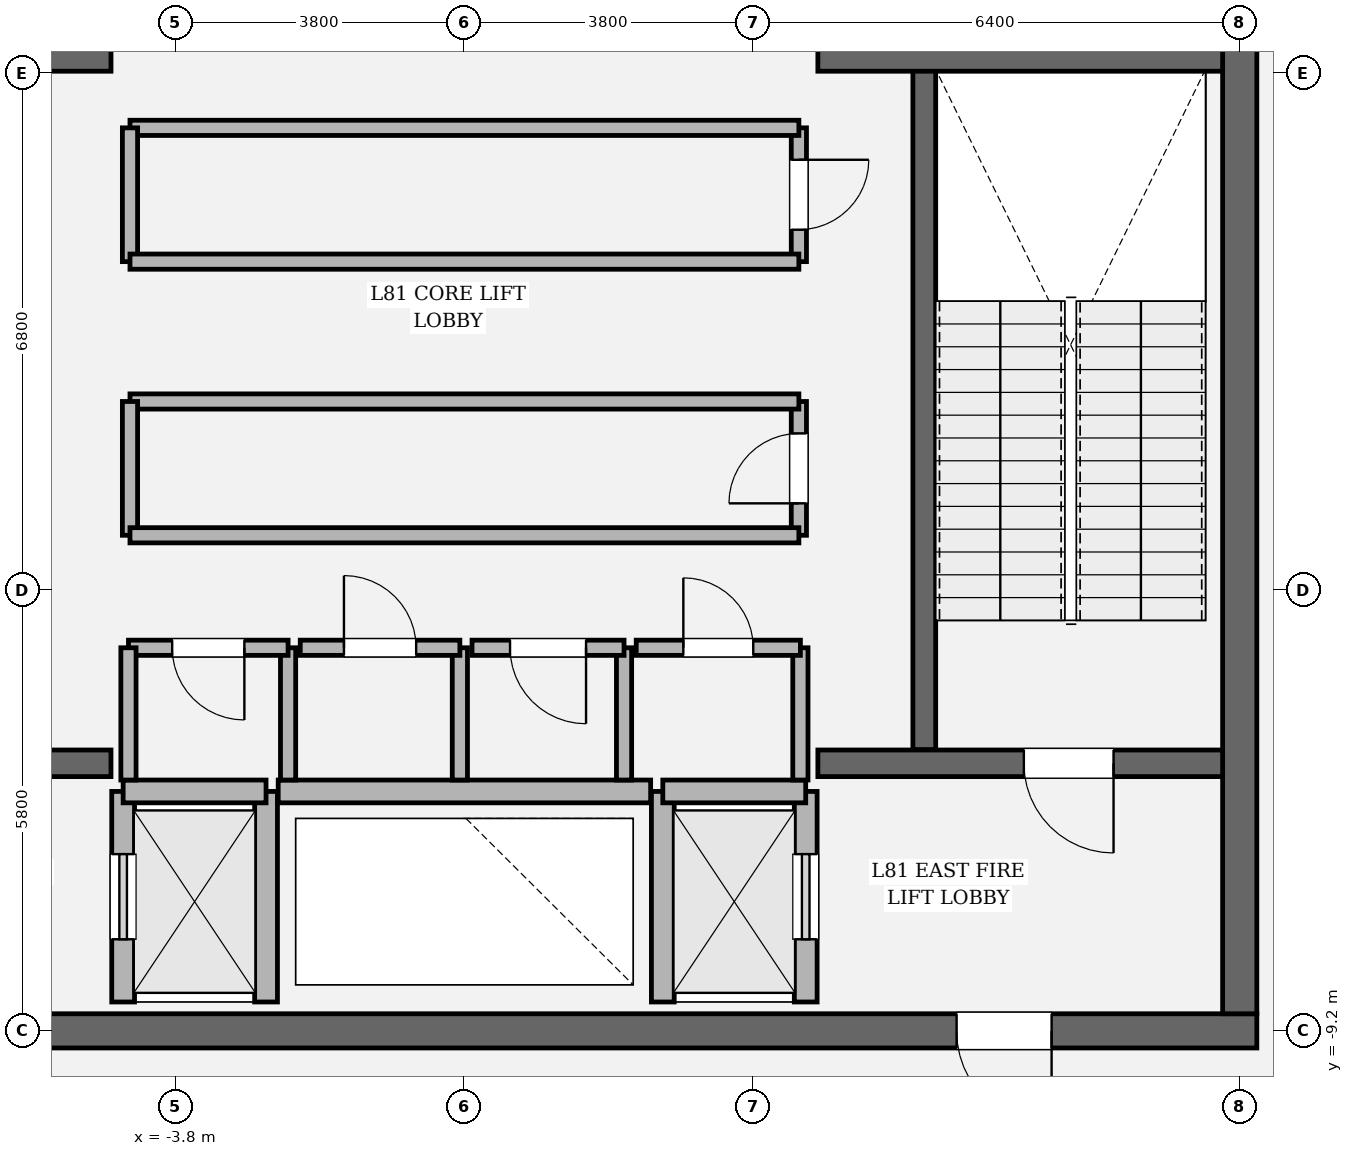
"""IFC4 building model, lengths in metres.
Left out: names, types, materials, properties, quantities, classifications, styles, units other than length and angle.
Written with IfcOpenShell. Run it as: python <this file> out.ifc"""

import sys

from ifc_helpers import new_model, si_unit, direction, frame, frame_2d, origin, place, context, subcontext, project, spatial, rectangle, extrude, element, fill, save


model = new_model("IFC4")
c1 = context("Model", 3, precision=1e-05, world=origin(), true_north=direction((0.0, 1.0)))
c2 = subcontext(c1, "Body", "Model", "MODEL_VIEW")
j1 = project(units=[si_unit("LENGTHUNIT", "METRE"), si_unit("PLANEANGLEUNIT", "RADIAN")], contexts=[c1])
p1 = place(None, origin())
s1 = spatial("IfcSite", under=j1, at=p1, CompositionType="ELEMENT")
p2 = place(p1, origin())
s2 = spatial("IfcBuilding", under=s1, at=p2, CompositionType="ELEMENT")
p3 = place(p2, frame((0.0, 0.0, 343.8)))
s3 = spatial("IfcBuildingStorey", under=s2, at=p3, CompositionType="ELEMENT", Elevation=343.8)
p4 = place(p3, frame((10.425, -9.2, 0.0), z_axis=(0.0, 0.0, 1.0), x_axis=(-1.0, 0.0, 0.0)))
e1 = element("IfcWall", 1, at=p4, inside=s3, PredefinedType="SHEAR", context=c2, shape_type="SweptSolid", body=[
    extrude(rectangle(XDim=20.85, YDim=0.45, at=frame_2d((10.425, 0.0))), origin(), (0.0, 0.0, 1.0), 4.5),
])
p5 = place(p4, frame((2.7, 0.0, 0.0)))
e2 = element("IfcOpeningElement", 2, at=p5, cuts=e1, PredefinedType="OPENING", context=c2, shape_type="SweptSolid", body=[
    extrude(rectangle(XDim=1.25, YDim=2.25, at=frame_2d((0.625, 1.125))), frame((0.0, 0.235, 0.0), z_axis=(0.0, -1.0, 0.0), x_axis=(1.0, 0.0, 0.0)), (0.0, 0.0, 1.0), 0.47),
])
p6 = place(p4, frame((16.9, 0.0, 0.0)))
e3 = element("IfcOpeningElement", 3, at=p6, cuts=e1, PredefinedType="OPENING", context=c2, shape_type="SweptSolid", body=[
    extrude(rectangle(XDim=1.25, YDim=2.25, at=frame_2d((0.625, 1.125))), frame((0.0, 0.235, 0.0), z_axis=(0.0, -1.0, 0.0), x_axis=(1.0, 0.0, 0.0)), (0.0, 0.0, 1.0), 0.47),
])
p7 = place(p3, frame((10.2, 8.975, 0.0), z_axis=(0.0, 0.0, 1.0), x_axis=(0.0, -1.0, 0.0)))
e4 = element("IfcWall", 4, at=p7, inside=s3, PredefinedType="SHEAR", context=c2, shape_type="SweptSolid", body=[
    extrude(rectangle(XDim=17.95, YDim=0.45, at=frame_2d((8.975, 0.0))), origin(), (0.0, 0.0, 1.0), 4.5),
])
p8 = place(p7, frame((4.005, 0.0, 0.0)))
e5 = element("IfcOpeningElement", 5, at=p8, cuts=e4, PredefinedType="OPENING", context=c2, shape_type="SweptSolid", body=[
    extrude(rectangle(XDim=1.18, YDim=2.2, at=frame_2d((0.59, 1.1))), frame((0.0, 0.235, 0.0), z_axis=(0.0, -1.0, 0.0), x_axis=(1.0, 0.0, 0.0)), (0.0, 0.0, 1.0), 0.47),
])
p9 = place(p3, frame((6.05, 3.45, 0.0), z_axis=(0.0, 0.0, 1.0), x_axis=(0.0, -1.0, 0.0)))
e6 = element("IfcWall", 6, at=p9, inside=s3, PredefinedType="SOLIDWALL", context=c2, shape_type="SweptSolid", body=[
    extrude(rectangle(XDim=8.95, YDim=0.3, at=frame_2d((4.475, 0.0))), origin(), (0.0, 0.0, 1.0), 4.5),
])
p10 = place(p3, frame((-9.975, -5.68, 0.0), z_axis=(0.0, 0.0, 1.0), x_axis=(1.0, 0.0, 0.0)))
e7 = element("IfcWall", 7, at=p10, inside=s3, PredefinedType="SOLIDWALL", context=c2, shape_type="SweptSolid", body=[
    extrude(rectangle(XDim=5.325, YDim=0.35, at=frame_2d((2.663, 0.0))), origin(), (0.0, 0.0, 1.0), 4.5),
])
p11 = place(p10, frame((1.435, 0.0, 0.0)))
e8 = element("IfcOpeningElement", 8, at=p11, cuts=e7, PredefinedType="OPENING", context=c2, shape_type="SweptSolid", body=[
    extrude(rectangle(XDim=1.18, YDim=2.2, at=frame_2d((0.59, 1.1))), frame((0.0, 0.185, 0.0), z_axis=(0.0, -1.0, 0.0), x_axis=(1.0, 0.0, 0.0)), (0.0, 0.0, 1.0), 0.37),
])
p12 = place(p3, frame((4.65, -5.68, 0.0), z_axis=(0.0, 0.0, 1.0), x_axis=(1.0, 0.0, 0.0)))
e9 = element("IfcWall", 9, at=p12, inside=s3, PredefinedType="SOLIDWALL", context=c2, shape_type="SweptSolid", body=[
    extrude(rectangle(XDim=5.325, YDim=0.35, at=frame_2d((2.663, 0.0))), origin(), (0.0, 0.0, 1.0), 4.5),
])
p13 = place(p12, frame((2.71, 0.0, 0.0)))
e10 = element("IfcOpeningElement", 10, at=p13, cuts=e9, PredefinedType="OPENING", context=c2, shape_type="SweptSolid", body=[
    extrude(rectangle(XDim=1.18, YDim=2.2, at=frame_2d((0.59, 1.1))), frame((0.0, 0.185, 0.0), z_axis=(0.0, -1.0, 0.0), x_axis=(1.0, 0.0, 0.0)), (0.0, 0.0, 1.0), 0.37),
])
for number, where, z_axis, x_axis in (
    (11, (-9.975, 3.6, 0.0), (0.0, 0.0, 1.0), (1.0, 0.0, 0.0)),
    (12, (4.65, 3.6, 0.0), (0.0, 0.0, 1.0), (1.0, 0.0, 0.0)),
):
    element("IfcWall", number, at=place(p3, frame(where, z_axis=z_axis, x_axis=x_axis)), inside=s3, PredefinedType="SOLIDWALL", context=c2, shape_type="SweptSolid", body=[
        extrude(rectangle(XDim=5.325, YDim=0.35, at=frame_2d((2.663, 0.0))), origin(), (0.0, 0.0, 1.0), 4.5),
    ])
p14 = place(p3, frame((-4.49, -8.82, 0.0), z_axis=(0.0, 0.0, 1.0), x_axis=(0.0, 1.0, 0.0)))
e13 = element("IfcWall", 13, at=p14, inside=s3, PredefinedType="SOLIDWALL", context=c2, shape_type="SweptSolid", body=[
    extrude(rectangle(XDim=2.77, YDim=0.3, at=frame_2d((1.385, 0.0))), origin(), (0.0, 0.0, 1.0), 4.28),
])
p15 = place(p14, frame((0.825, 0.0, 0.0)))
e14 = element("IfcOpeningElement", 14, at=p15, cuts=e13, PredefinedType="OPENING", context=c2, shape_type="SweptSolid", body=[
    extrude(rectangle(XDim=1.12, YDim=2.25, at=frame_2d((0.56, 1.125))), frame((0.0, 0.16, 0.0), z_axis=(0.0, -1.0, 0.0), x_axis=(1.0, 0.0, 0.0)), (0.0, 0.0, 1.0), 0.32),
])
p16 = place(p3, frame((-2.61, -8.82, 0.0), z_axis=(0.0, 0.0, 1.0), x_axis=(0.0, 1.0, 0.0)))
e15 = element("IfcWall", 15, at=p16, inside=s3, PredefinedType="SOLIDWALL", context=c2, shape_type="SweptSolid", body=[
    extrude(rectangle(XDim=2.77, YDim=0.3, at=frame_2d((1.385, 0.0))), origin(), (0.0, 0.0, 1.0), 4.28),
])
p17 = place(p3, frame((-4.49, -6.05, 0.0), z_axis=(0.0, 0.0, 1.0), x_axis=(1.0, 0.0, 0.0)))
e16 = element("IfcWall", 16, at=p17, inside=s3, PredefinedType="SOLIDWALL", context=c2, shape_type="SweptSolid", body=[
    extrude(rectangle(XDim=1.88, YDim=0.3, at=frame_2d((0.94, 0.0))), origin(), (0.0, 0.0, 1.0), 4.28),
])
p18 = place(p3, frame((4.49, -8.82, 0.0), z_axis=(0.0, 0.0, 1.0), x_axis=(0.0, 1.0, 0.0)))
e17 = element("IfcWall", 17, at=p18, inside=s3, PredefinedType="SOLIDWALL", context=c2, shape_type="SweptSolid", body=[
    extrude(rectangle(XDim=2.77, YDim=0.3, at=frame_2d((1.385, 0.0))), origin(), (0.0, 0.0, 1.0), 4.28),
])
p19 = place(p18, frame((0.825, 0.0, 0.0)))
e18 = element("IfcOpeningElement", 18, at=p19, cuts=e17, PredefinedType="OPENING", context=c2, shape_type="SweptSolid", body=[
    extrude(rectangle(XDim=1.12, YDim=2.25, at=frame_2d((0.56, 1.125))), frame((0.0, 0.16, 0.0), z_axis=(0.0, -1.0, 0.0), x_axis=(1.0, 0.0, 0.0)), (0.0, 0.0, 1.0), 0.32),
])
p20 = place(p3, frame((2.61, -8.82, 0.0), z_axis=(0.0, 0.0, 1.0), x_axis=(0.0, 1.0, 0.0)))
e19 = element("IfcWall", 19, at=p20, inside=s3, PredefinedType="SOLIDWALL", context=c2, shape_type="SweptSolid", body=[
    extrude(rectangle(XDim=2.77, YDim=0.3, at=frame_2d((1.385, 0.0))), origin(), (0.0, 0.0, 1.0), 4.28),
])
p21 = place(p3, frame((2.61, -6.05, 0.0), z_axis=(0.0, 0.0, 1.0), x_axis=(1.0, 0.0, 0.0)))
e20 = element("IfcWall", 20, at=p21, inside=s3, PredefinedType="SOLIDWALL", context=c2, shape_type="SweptSolid", body=[
    extrude(rectangle(XDim=1.88, YDim=0.3, at=frame_2d((0.94, 0.0))), origin(), (0.0, 0.0, 1.0), 4.28),
])
p22 = place(p3, frame((-2.45, -6.05, 0.0), z_axis=(0.0, 0.0, 1.0), x_axis=(1.0, 0.0, 0.0)))
e21 = element("IfcWall", 21, at=p22, inside=s3, PredefinedType="SOLIDWALL", context=c2, shape_type="SweptSolid", body=[
    extrude(rectangle(XDim=4.9, YDim=0.3, at=frame_2d((2.45, 0.0))), origin(), (0.0, 0.0, 1.0), 4.28),
])
p23 = place(p3, frame((-2.32, -5.9, 0.0), z_axis=(0.0, 0.0, 1.0), x_axis=(0.0, 1.0, 0.0)))
e22 = element("IfcWall", 22, at=p23, inside=s3, PredefinedType="SOLIDWALL", context=c2, shape_type="SweptSolid", body=[
    extrude(rectangle(XDim=1.74, YDim=0.2, at=frame_2d((0.87, 0.0))), origin(), (0.0, 0.0, 1.0), 4.28),
])
p24 = place(p3, frame((-2.32, -4.16, 0.0), z_axis=(0.0, 0.0, 1.0), x_axis=(-1.0, 0.0, 0.0)))
e23 = element("IfcWall", 23, at=p24, inside=s3, PredefinedType="SOLIDWALL", context=c2, shape_type="SweptSolid", body=[
    extrude(rectangle(XDim=2.1, YDim=0.2, at=frame_2d((1.05, 0.0))), origin(), (0.0, 0.0, 1.0), 4.28),
])
p25 = place(p24, frame((0.575, 0.0, 0.0)))
e24 = element("IfcOpeningElement", 24, at=p25, cuts=e23, PredefinedType="OPENING", context=c2, shape_type="SweptSolid", body=[
    extrude(rectangle(XDim=0.95, YDim=2.15, at=frame_2d((0.475, 1.075))), frame((0.0, 0.11, 0.0), z_axis=(0.0, -1.0, 0.0), x_axis=(1.0, 0.0, 0.0)), (0.0, 0.0, 1.0), 0.22),
])
for number, where, z_axis, x_axis in (
    (25, (-4.42, -4.16, 0.0), (0.0, 0.0, 1.0), (0.0, -1.0, 0.0)),
    (26, (-0.06, -5.9, 0.0), (0.0, 0.0, 1.0), (0.0, 1.0, 0.0)),
):
    element("IfcWall", number, at=place(p3, frame(where, z_axis=z_axis, x_axis=x_axis)), inside=s3, PredefinedType="SOLIDWALL", context=c2, shape_type="SweptSolid", body=[
        extrude(rectangle(XDim=1.74, YDim=0.2, at=frame_2d((0.87, 0.0))), origin(), (0.0, 0.0, 1.0), 4.28),
    ])
p26 = place(p3, frame((-0.06, -4.16, 0.0), z_axis=(0.0, 0.0, 1.0), x_axis=(-1.0, 0.0, 0.0)))
e27 = element("IfcWall", 27, at=p26, inside=s3, PredefinedType="SOLIDWALL", context=c2, shape_type="SweptSolid", body=[
    extrude(rectangle(XDim=2.1, YDim=0.2, at=frame_2d((1.05, 0.0))), origin(), (0.0, 0.0, 1.0), 4.28),
])
p27 = place(p26, frame((0.575, 0.0, 0.0)))
e28 = element("IfcOpeningElement", 28, at=p27, cuts=e27, PredefinedType="OPENING", context=c2, shape_type="SweptSolid", body=[
    extrude(rectangle(XDim=0.95, YDim=2.15, at=frame_2d((0.475, 1.075))), frame((0.0, 0.11, 0.0), z_axis=(0.0, -1.0, 0.0), x_axis=(1.0, 0.0, 0.0)), (0.0, 0.0, 1.0), 0.22),
])
p28 = place(p3, frame((2.1, -5.9, 0.0), z_axis=(0.0, 0.0, 1.0), x_axis=(0.0, 1.0, 0.0)))
e29 = element("IfcWall", 29, at=p28, inside=s3, PredefinedType="SOLIDWALL", context=c2, shape_type="SweptSolid", body=[
    extrude(rectangle(XDim=1.74, YDim=0.2, at=frame_2d((0.87, 0.0))), origin(), (0.0, 0.0, 1.0), 4.28),
])
p29 = place(p3, frame((2.1, -4.16, 0.0), z_axis=(0.0, 0.0, 1.0), x_axis=(-1.0, 0.0, 0.0)))
e30 = element("IfcWall", 30, at=p29, inside=s3, PredefinedType="SOLIDWALL", context=c2, shape_type="SweptSolid", body=[
    extrude(rectangle(XDim=2.0, YDim=0.2, at=frame_2d((1.0, 0.0))), origin(), (0.0, 0.0, 1.0), 4.28),
])
p30 = place(p29, frame((0.5, 0.0, 0.0)))
e31 = element("IfcOpeningElement", 31, at=p30, cuts=e30, PredefinedType="OPENING", context=c2, shape_type="SweptSolid", body=[
    extrude(rectangle(XDim=1.0, YDim=2.15, at=frame_2d((0.5, 1.075))), frame((0.0, 0.11, 0.0), z_axis=(0.0, -1.0, 0.0), x_axis=(1.0, 0.0, 0.0)), (0.0, 0.0, 1.0), 0.22),
])
p31 = place(p3, frame((4.42, -5.9, 0.0), z_axis=(0.0, 0.0, 1.0), x_axis=(0.0, 1.0, 0.0)))
e32 = element("IfcWall", 32, at=p31, inside=s3, PredefinedType="SOLIDWALL", context=c2, shape_type="SweptSolid", body=[
    extrude(rectangle(XDim=1.74, YDim=0.2, at=frame_2d((0.87, 0.0))), origin(), (0.0, 0.0, 1.0), 4.28),
])
p32 = place(p3, frame((4.42, -4.16, 0.0), z_axis=(0.0, 0.0, 1.0), x_axis=(-1.0, 0.0, 0.0)))
e33 = element("IfcWall", 33, at=p32, inside=s3, PredefinedType="SOLIDWALL", context=c2, shape_type="SweptSolid", body=[
    extrude(rectangle(XDim=2.16, YDim=0.2, at=frame_2d((1.08, 0.0))), origin(), (0.0, 0.0, 1.0), 4.28),
])
p33 = place(p32, frame((0.62, 0.0, 0.0)))
e34 = element("IfcOpeningElement", 34, at=p33, cuts=e33, PredefinedType="OPENING", context=c2, shape_type="SweptSolid", body=[
    extrude(rectangle(XDim=0.92, YDim=2.1, at=frame_2d((0.46, 1.05))), frame((0.0, 0.11, 0.0), z_axis=(0.0, -1.0, 0.0), x_axis=(1.0, 0.0, 0.0)), (0.0, 0.0, 1.0), 0.22),
])
p34 = place(p3, frame((4.4, -2.68, 0.0), z_axis=(0.0, 0.0, 1.0), x_axis=(0.0, 1.0, 0.0)))
e35 = element("IfcWall", 35, at=p34, inside=s3, PredefinedType="SOLIDWALL", context=c2, shape_type="SweptSolid", body=[
    extrude(rectangle(XDim=1.76, YDim=0.2, at=frame_2d((0.88, 0.0))), origin(), (0.0, 0.0, 1.0), 4.28),
])
p35 = place(p34, frame((0.42, 0.0, 0.0)))
e36 = element("IfcOpeningElement", 36, at=p35, cuts=e35, PredefinedType="OPENING", context=c2, shape_type="SweptSolid", body=[
    extrude(rectangle(XDim=0.92, YDim=2.1, at=frame_2d((0.46, 1.05))), frame((0.0, 0.11, 0.0), z_axis=(0.0, -1.0, 0.0), x_axis=(1.0, 0.0, 0.0)), (0.0, 0.0, 1.0), 0.22),
])
p36 = place(p3, frame((4.4, -0.92, 0.0), z_axis=(0.0, 0.0, 1.0), x_axis=(-1.0, 0.0, 0.0)))
e37 = element("IfcWall", 37, at=p36, inside=s3, PredefinedType="SOLIDWALL", context=c2, shape_type="SweptSolid", body=[
    extrude(rectangle(XDim=8.8, YDim=0.2, at=frame_2d((4.4, 0.0))), origin(), (0.0, 0.0, 1.0), 4.28),
])
p37 = place(p3, frame((-4.4, -0.92, 0.0), z_axis=(0.0, 0.0, 1.0), x_axis=(0.0, -1.0, 0.0)))
e38 = element("IfcWall", 38, at=p37, inside=s3, PredefinedType="SOLIDWALL", context=c2, shape_type="SweptSolid", body=[
    extrude(rectangle(XDim=1.76, YDim=0.2, at=frame_2d((0.88, 0.0))), origin(), (0.0, 0.0, 1.0), 4.28),
])
p38 = place(p3, frame((-4.4, -2.68, 0.0), z_axis=(0.0, 0.0, 1.0), x_axis=(1.0, 0.0, 0.0)))
e39 = element("IfcWall", 39, at=p38, inside=s3, PredefinedType="SOLIDWALL", context=c2, shape_type="SweptSolid", body=[
    extrude(rectangle(XDim=8.8, YDim=0.2, at=frame_2d((4.4, 0.0))), origin(), (0.0, 0.0, 1.0), 4.28),
])
p39 = place(p3, frame((4.4, 0.92, 0.0), z_axis=(0.0, 0.0, 1.0), x_axis=(0.0, 1.0, 0.0)))
e40 = element("IfcWall", 40, at=p39, inside=s3, PredefinedType="SOLIDWALL", context=c2, shape_type="SweptSolid", body=[
    extrude(rectangle(XDim=1.76, YDim=0.2, at=frame_2d((0.88, 0.0))), origin(), (0.0, 0.0, 1.0), 4.28),
])
p40 = place(p39, frame((0.42, 0.0, 0.0)))
e41 = element("IfcOpeningElement", 41, at=p40, cuts=e40, PredefinedType="OPENING", context=c2, shape_type="SweptSolid", body=[
    extrude(rectangle(XDim=0.92, YDim=2.1, at=frame_2d((0.46, 1.05))), frame((0.0, 0.11, 0.0), z_axis=(0.0, -1.0, 0.0), x_axis=(1.0, 0.0, 0.0)), (0.0, 0.0, 1.0), 0.22),
])
p41 = place(p3, frame((4.4, 2.68, 0.0), z_axis=(0.0, 0.0, 1.0), x_axis=(-1.0, 0.0, 0.0)))
e42 = element("IfcWall", 42, at=p41, inside=s3, PredefinedType="SOLIDWALL", context=c2, shape_type="SweptSolid", body=[
    extrude(rectangle(XDim=8.8, YDim=0.2, at=frame_2d((4.4, 0.0))), origin(), (0.0, 0.0, 1.0), 4.28),
])
p42 = place(p3, frame((-4.4, 2.68, 0.0), z_axis=(0.0, 0.0, 1.0), x_axis=(0.0, -1.0, 0.0)))
e43 = element("IfcWall", 43, at=p42, inside=s3, PredefinedType="SOLIDWALL", context=c2, shape_type="SweptSolid", body=[
    extrude(rectangle(XDim=1.76, YDim=0.2, at=frame_2d((0.88, 0.0))), origin(), (0.0, 0.0, 1.0), 4.28),
])
p43 = place(p3, frame((-4.4, 0.92, 0.0), z_axis=(0.0, 0.0, 1.0), x_axis=(1.0, 0.0, 0.0)))
e44 = element("IfcWall", 44, at=p43, inside=s3, PredefinedType="SOLIDWALL", context=c2, shape_type="SweptSolid", body=[
    extrude(rectangle(XDim=8.8, YDim=0.2, at=frame_2d((4.4, 0.0))), origin(), (0.0, 0.0, 1.0), 4.28),
])
p44 = place(p13, origin())
e45 = element("IfcDoor", 45, at=p44, inside=s3, OperationType="SINGLE_SWING_RIGHT", PredefinedType="DOOR", context=c2, shape_type="SweptSolid", body=[
    extrude(rectangle(XDim=1.18, YDim=2.2, at=frame_2d((0.59, 1.1))), frame((0.0, 0.025, 0.0), z_axis=(0.0, -1.0, 0.0), x_axis=(1.0, 0.0, 0.0)), (0.0, 0.0, 1.0), 0.05),
])
fill(e10, e45)
p45 = place(p5, origin())
e46 = element("IfcDoor", 46, at=p45, inside=s3, OperationType="SINGLE_SWING_LEFT", PredefinedType="DOOR", context=c2, shape_type="SweptSolid", body=[
    extrude(rectangle(XDim=1.25, YDim=2.25, at=frame_2d((0.625, 1.125))), frame((0.0, 0.025, 0.0), z_axis=(0.0, -1.0, 0.0), x_axis=(1.0, 0.0, 0.0)), (0.0, 0.0, 1.0), 0.05),
])
fill(e2, e46)
p46 = place(p15, origin())
e47 = element("IfcDoor", 47, at=p46, inside=s3, OperationType="SLIDING_TO_LEFT", PredefinedType="DOOR", context=c2, shape_type="SweptSolid", body=[
    extrude(rectangle(XDim=1.12, YDim=2.25, at=frame_2d((0.56, 1.125))), frame((0.0, 0.025, 0.0), z_axis=(0.0, -1.0, 0.0), x_axis=(1.0, 0.0, 0.0)), (0.0, 0.0, 1.0), 0.05),
])
fill(e14, e47)
p47 = place(p19, origin())
e48 = element("IfcDoor", 48, at=p47, inside=s3, OperationType="SLIDING_TO_RIGHT", PredefinedType="DOOR", context=c2, shape_type="SweptSolid", body=[
    extrude(rectangle(XDim=1.12, YDim=2.25, at=frame_2d((0.56, 1.125))), frame((0.0, 0.025, 0.0), z_axis=(0.0, -1.0, 0.0), x_axis=(1.0, 0.0, 0.0)), (0.0, 0.0, 1.0), 0.05),
])
fill(e18, e48)
p48 = place(p25, origin())
e49 = element("IfcDoor", 49, at=p48, inside=s3, OperationType="SINGLE_SWING_LEFT", PredefinedType="DOOR", context=c2, shape_type="SweptSolid", body=[
    extrude(rectangle(XDim=0.95, YDim=2.15, at=frame_2d((0.475, 1.075))), frame((0.0, 0.025, 0.0), z_axis=(0.0, -1.0, 0.0), x_axis=(1.0, 0.0, 0.0)), (0.0, 0.0, 1.0), 0.05),
])
fill(e24, e49)
p49 = place(p27, origin())
e50 = element("IfcDoor", 50, at=p49, inside=s3, OperationType="SINGLE_SWING_RIGHT", PredefinedType="DOOR", context=c2, shape_type="SweptSolid", body=[
    extrude(rectangle(XDim=0.95, YDim=2.15, at=frame_2d((0.475, 1.075))), frame((0.0, 0.025, 0.0), z_axis=(0.0, -1.0, 0.0), x_axis=(1.0, 0.0, 0.0)), (0.0, 0.0, 1.0), 0.05),
])
fill(e28, e50)
p50 = place(p30, origin())
e51 = element("IfcDoor", 51, at=p50, inside=s3, OperationType="SINGLE_SWING_LEFT", PredefinedType="DOOR", context=c2, shape_type="SweptSolid", body=[
    extrude(rectangle(XDim=1.0, YDim=2.15, at=frame_2d((0.5, 1.075))), frame((0.0, 0.025, 0.0), z_axis=(0.0, -1.0, 0.0), x_axis=(1.0, 0.0, 0.0)), (0.0, 0.0, 1.0), 0.05),
])
fill(e31, e51)
p51 = place(p33, origin())
e52 = element("IfcDoor", 52, at=p51, inside=s3, OperationType="SINGLE_SWING_RIGHT", PredefinedType="DOOR", context=c2, shape_type="SweptSolid", body=[
    extrude(rectangle(XDim=0.92, YDim=2.1, at=frame_2d((0.46, 1.05))), frame((0.0, 0.025, 0.0), z_axis=(0.0, -1.0, 0.0), x_axis=(1.0, 0.0, 0.0)), (0.0, 0.0, 1.0), 0.05),
])
fill(e34, e52)
p52 = place(p35, origin())
e53 = element("IfcDoor", 53, at=p52, inside=s3, OperationType="SINGLE_SWING_LEFT", PredefinedType="DOOR", context=c2, shape_type="SweptSolid", body=[
    extrude(rectangle(XDim=0.92, YDim=2.1, at=frame_2d((0.46, 1.05))), frame((0.0, 0.025, 0.0), z_axis=(0.0, -1.0, 0.0), x_axis=(1.0, 0.0, 0.0)), (0.0, 0.0, 1.0), 0.05),
])
fill(e36, e53)
p53 = place(p40, origin())
e54 = element("IfcDoor", 54, at=p53, inside=s3, OperationType="SINGLE_SWING_RIGHT", PredefinedType="DOOR", context=c2, shape_type="SweptSolid", body=[
    extrude(rectangle(XDim=0.92, YDim=2.1, at=frame_2d((0.46, 1.05))), frame((0.0, 0.025, 0.0), z_axis=(0.0, -1.0, 0.0), x_axis=(1.0, 0.0, 0.0)), (0.0, 0.0, 1.0), 0.05),
])
fill(e41, e54)
save(model, sys.argv[1])
